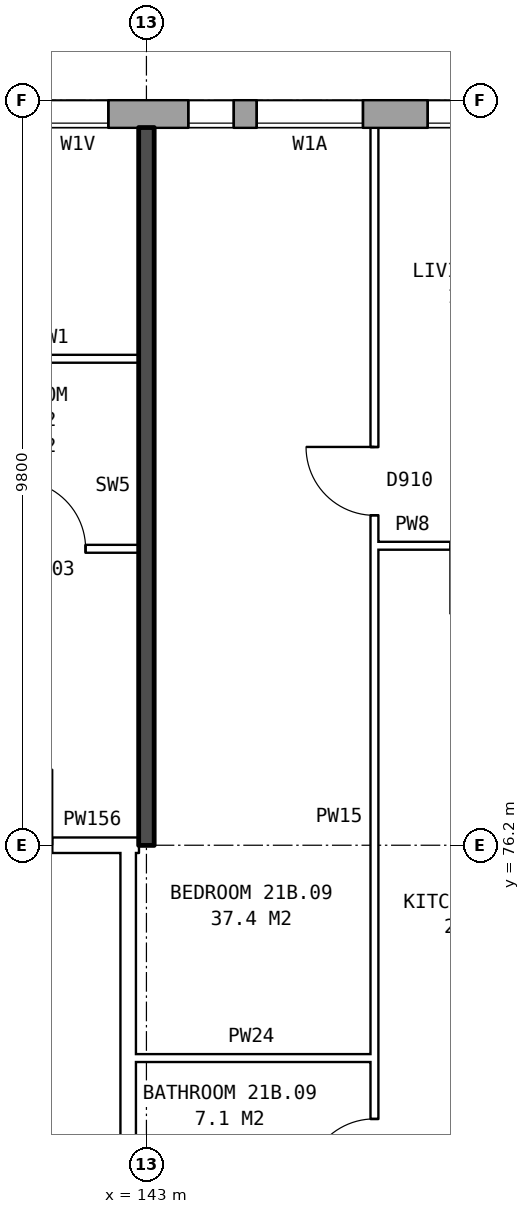
"""IFC4 building model, lengths in metres.
Left out: names, types, materials, properties, quantities, classifications, styles, units other than length and angle.
Written with IfcOpenShell. Run it as: python <this file> out.ifc"""

import sys

from ifc_helpers import new_model, si_unit, direction, frame, frame_2d, origin, place, context, subcontext, project, spatial, rectangle, extrude, element, fill, save


model = new_model("IFC4")
c1 = context("Model", 3, precision=1e-05, world=origin(), true_north=direction((0.0, 1.0)))
c2 = subcontext(c1, "Body", "Model", "MODEL_VIEW")
j1 = project(units=[si_unit("LENGTHUNIT", "METRE"), si_unit("PLANEANGLEUNIT", "RADIAN")], contexts=[c1])
p1 = place(None, origin())
s1 = spatial("IfcSite", under=j1, at=p1, CompositionType="ELEMENT")
p2 = place(p1, origin())
s2 = spatial("IfcBuilding", under=s1, at=p2, CompositionType="ELEMENT")
p3 = place(p2, frame((0.0, 0.0, 77.8)))
s3 = spatial("IfcBuildingStorey", under=s2, at=p3, CompositionType="ELEMENT", Elevation=77.8)
p4 = place(p3, frame((172.175, 85.82, 0.0), z_axis=(0.0, 0.0, 1.0), x_axis=(-1.0, 0.0, 0.0)))
e1 = element("IfcWall", 1, at=p4, inside=s3, PredefinedType="STANDARD", context=c2, shape_type="SweptSolid", body=[
    extrude(rectangle(XDim=38.101, YDim=0.36, at=frame_2d((19.05, 0.0))), origin(), (0.0, 0.0, 1.0), 2.85),
])
p5 = place(p4, frame((2.875, 0.0, 0.8)))
e2 = element("IfcOpeningElement", 2, at=p5, cuts=e1, PredefinedType="OPENING", context=c2, shape_type="SweptSolid", body=[
    extrude(rectangle(XDim=1.6, YDim=1.8, at=frame_2d((0.8, 0.9))), frame((0.0, 0.19, 0.0), z_axis=(0.0, -1.0, 0.0), x_axis=(1.0, 0.0, 0.0)), (0.0, 0.0, 1.0), 0.38),
])
p6 = place(p4, frame((5.875, 0.0, 0.8)))
e3 = element("IfcOpeningElement", 3, at=p6, cuts=e1, PredefinedType="OPENING", context=c2, shape_type="SweptSolid", body=[
    extrude(rectangle(XDim=1.6, YDim=1.8, at=frame_2d((0.8, 0.9))), frame((0.0, 0.19, 0.0), z_axis=(0.0, -1.0, 0.0), x_axis=(1.0, 0.0, 0.0)), (0.0, 0.0, 1.0), 0.38),
])
p7 = place(p4, frame((7.775, 0.0, 1.7)))
e4 = element("IfcOpeningElement", 4, at=p7, cuts=e1, PredefinedType="OPENING", context=c2, shape_type="SweptSolid", body=[
    extrude(rectangle(XDim=0.6, YDim=0.9, at=frame_2d((0.3, 0.45))), frame((0.0, 0.19, 0.0), z_axis=(0.0, -1.0, 0.0), x_axis=(1.0, 0.0, 0.0)), (0.0, 0.0, 1.0), 0.38),
])
p8 = place(p4, frame((11.875, 0.0, 0.8)))
e5 = element("IfcOpeningElement", 5, at=p8, cuts=e1, PredefinedType="OPENING", context=c2, shape_type="SweptSolid", body=[
    extrude(rectangle(XDim=1.6, YDim=1.8, at=frame_2d((0.8, 0.9))), frame((0.0, 0.19, 0.0), z_axis=(0.0, -1.0, 0.0), x_axis=(1.0, 0.0, 0.0)), (0.0, 0.0, 1.0), 0.38),
])
p9 = place(p4, frame((14.875, 0.0, 0.8)))
e6 = element("IfcOpeningElement", 6, at=p9, cuts=e1, PredefinedType="OPENING", context=c2, shape_type="SweptSolid", body=[
    extrude(rectangle(XDim=1.6, YDim=1.8, at=frame_2d((0.8, 0.9))), frame((0.0, 0.19, 0.0), z_axis=(0.0, -1.0, 0.0), x_axis=(1.0, 0.0, 0.0)), (0.0, 0.0, 1.0), 0.38),
])
p10 = place(p4, frame((17.875, 0.0, 0.8)))
e7 = element("IfcOpeningElement", 7, at=p10, cuts=e1, PredefinedType="OPENING", context=c2, shape_type="SweptSolid", body=[
    extrude(rectangle(XDim=1.6, YDim=1.8, at=frame_2d((0.8, 0.9))), frame((0.0, 0.19, 0.0), z_axis=(0.0, -1.0, 0.0), x_axis=(1.0, 0.0, 0.0)), (0.0, 0.0, 1.0), 0.38),
])
p11 = place(p4, frame((20.875, 0.0, 0.8)))
e8 = element("IfcOpeningElement", 8, at=p11, cuts=e1, PredefinedType="OPENING", context=c2, shape_type="SweptSolid", body=[
    extrude(rectangle(XDim=1.6, YDim=1.8, at=frame_2d((0.8, 0.9))), frame((0.0, 0.19, 0.0), z_axis=(0.0, -1.0, 0.0), x_axis=(1.0, 0.0, 0.0)), (0.0, 0.0, 1.0), 0.38),
])
p12 = place(p4, frame((23.875, 0.0, 0.8)))
e9 = element("IfcOpeningElement", 9, at=p12, cuts=e1, PredefinedType="OPENING", context=c2, shape_type="SweptSolid", body=[
    extrude(rectangle(XDim=1.6, YDim=1.8, at=frame_2d((0.8, 0.9))), frame((0.0, 0.19, 0.0), z_axis=(0.0, -1.0, 0.0), x_axis=(1.0, 0.0, 0.0)), (0.0, 0.0, 1.0), 0.38),
])
p13 = place(p4, frame((26.325, 0.0, 0.65)))
e10 = element("IfcOpeningElement", 10, at=p13, cuts=e1, PredefinedType="OPENING", context=c2, shape_type="SweptSolid", body=[
    extrude(rectangle(XDim=1.4, YDim=1.8, at=frame_2d((0.7, 0.9))), frame((0.0, 0.19, 0.0), z_axis=(0.0, -1.0, 0.0), x_axis=(1.0, 0.0, 0.0)), (0.0, 0.0, 1.0), 0.38),
])
p14 = place(p4, frame((29.675, 0.0, 1.7)))
e11 = element("IfcOpeningElement", 11, at=p14, cuts=e1, PredefinedType="OPENING", context=c2, shape_type="SweptSolid", body=[
    extrude(rectangle(XDim=0.8, YDim=0.9, at=frame_2d((0.4, 0.45))), frame((0.0, 0.19, 0.0), z_axis=(0.0, -1.0, 0.0), x_axis=(1.0, 0.0, 0.0)), (0.0, 0.0, 1.0), 0.38),
])
p15 = place(p4, frame((32.875, 0.0, 0.8)))
e12 = element("IfcOpeningElement", 12, at=p15, cuts=e1, PredefinedType="OPENING", context=c2, shape_type="SweptSolid", body=[
    extrude(rectangle(XDim=1.6, YDim=1.8, at=frame_2d((0.8, 0.9))), frame((0.0, 0.19, 0.0), z_axis=(0.0, -1.0, 0.0), x_axis=(1.0, 0.0, 0.0)), (0.0, 0.0, 1.0), 0.38),
])
p16 = place(p4, frame((35.875, 0.0, 0.8)))
e13 = element("IfcOpeningElement", 13, at=p16, cuts=e1, PredefinedType="OPENING", context=c2, shape_type="SweptSolid", body=[
    extrude(rectangle(XDim=1.6, YDim=1.8, at=frame_2d((0.8, 0.9))), frame((0.0, 0.19, 0.0), z_axis=(0.0, -1.0, 0.0), x_axis=(1.0, 0.0, 0.0)), (0.0, 0.0, 1.0), 0.38),
])
p17 = place(p4, frame((9.575, 0.0, 0.8)))
e14 = element("IfcOpeningElement", 14, at=p17, cuts=e1, PredefinedType="OPENING", context=c2, shape_type="SweptSolid", body=[
    extrude(rectangle(XDim=1.4, YDim=0.9, at=frame_2d((0.7, 0.45))), frame((0.0, 0.19, 0.0), z_axis=(0.0, -1.0, 0.0), x_axis=(1.0, 0.0, 0.0)), (0.0, 0.0, 1.0), 0.38),
])
p18 = place(p4, frame((28.025, 0.0, 0.65)))
e15 = element("IfcOpeningElement", 15, at=p18, cuts=e1, PredefinedType="OPENING", context=c2, shape_type="SweptSolid", body=[
    extrude(rectangle(XDim=0.6, YDim=0.9, at=frame_2d((0.3, 0.45))), frame((0.0, 0.19, 0.0), z_axis=(0.0, -1.0, 0.0), x_axis=(1.0, 0.0, 0.0)), (0.0, 0.0, 1.0), 0.38),
])
p19 = place(p4, frame((30.775, 0.0, 0.8)))
e16 = element("IfcOpeningElement", 16, at=p19, cuts=e1, PredefinedType="OPENING", context=c2, shape_type="SweptSolid", body=[
    extrude(rectangle(XDim=1.6, YDim=1.8, at=frame_2d((0.8, 0.9))), frame((0.0, 0.19, 0.0), z_axis=(0.0, -1.0, 0.0), x_axis=(1.0, 0.0, 0.0)), (0.0, 0.0, 1.0), 0.38),
])
p20 = place(p3, frame((142.76, 63.9, 0.0), z_axis=(0.0, 0.0, 1.0), x_axis=(0.0, 1.0, 0.0)))
e17 = element("IfcWall", 17, at=p20, inside=s3, PredefinedType="PARTITIONING", context=c2, shape_type="SweptSolid", body=[
    extrude(rectangle(XDim=12.2, YDim=0.2, at=frame_2d((6.1, 0.0))), origin(), (0.0, 0.0, 1.0), 2.85),
])
p21 = place(p20, frame((5.1, 0.0, 0.0)))
e18 = element("IfcOpeningElement", 18, at=p21, cuts=e17, PredefinedType="OPENING", context=c2, shape_type="SweptSolid", body=[
    extrude(rectangle(XDim=2.0, YDim=2.1, at=frame_2d((1.0, 1.05))), frame((0.0, 0.11, 0.0), z_axis=(0.0, -1.0, 0.0), x_axis=(1.0, 0.0, 0.0)), (0.0, 0.0, 1.0), 0.22),
])
p22 = place(p3, frame((142.76, 73.4, 0.0), z_axis=(0.0, 0.0, 1.0), x_axis=(1.0, 0.0, 0.0)))
e19 = element("IfcWall", 19, at=p22, inside=s3, PredefinedType="PARTITIONING", context=c2, shape_type="SweptSolid", body=[
    extrude(rectangle(XDim=3.24, YDim=0.1, at=frame_2d((1.62, 0.0))), origin(), (0.0, 0.0, 1.0), 2.85),
])
p23 = place(p3, frame((139.76, 76.2, 0.0), z_axis=(0.0, 0.0, 1.0), x_axis=(1.0, 0.0, 0.0)))
e20 = element("IfcWall", 20, at=p23, inside=s3, PredefinedType="PARTITIONING", context=c2, shape_type="SweptSolid", body=[
    extrude(rectangle(XDim=3.0, YDim=0.2, at=frame_2d((1.5, 0.0))), origin(), (0.0, 0.0, 1.0), 2.85),
])
p24 = place(p23, frame((1.0, 0.0, 0.0)))
e21 = element("IfcOpeningElement", 21, at=p24, cuts=e20, PredefinedType="OPENING", context=c2, shape_type="SweptSolid", body=[
    extrude(rectangle(XDim=1.0, YDim=2.1, at=frame_2d((0.5, 1.05))), frame((0.0, 0.11, 0.0), z_axis=(0.0, -1.0, 0.0), x_axis=(1.0, 0.0, 0.0)), (0.0, 0.0, 1.0), 0.22),
])
p25 = place(p3, frame((142.76, 76.2, 0.0), z_axis=(0.0, 0.0, 1.0), x_axis=(1.0, 0.0, 0.0)))
e22 = element("IfcWall", 22, at=p25, inside=s3, PredefinedType="PARTITIONING", context=c2, shape_type="SweptSolid", body=[
    extrude(rectangle(XDim=0.14, YDim=0.2, at=frame_2d((0.07, 0.0))), origin(), (0.0, 0.0, 1.0), 2.85),
])
p26 = place(p3, frame((137.1, 80.1, 0.0), z_axis=(0.0, 0.0, 1.0), x_axis=(1.0, 0.0, 0.0)))
e23 = element("IfcWall", 23, at=p26, inside=s3, PredefinedType="PARTITIONING", context=c2, shape_type="SweptSolid", body=[
    extrude(rectangle(XDim=5.8, YDim=0.1, at=frame_2d((2.9, 0.0))), origin(), (0.0, 0.0, 1.0), 2.85),
])
p27 = place(p26, frame((1.3, 0.0, 0.0)))
e24 = element("IfcOpeningElement", 24, at=p27, cuts=e23, PredefinedType="OPENING", context=c2, shape_type="SweptSolid", body=[
    extrude(rectangle(XDim=0.9, YDim=2.1, at=frame_2d((0.45, 1.05))), frame((0.0, 0.06, 0.0), z_axis=(0.0, -1.0, 0.0), x_axis=(1.0, 0.0, 0.0)), (0.0, 0.0, 1.0), 0.12),
])
p28 = place(p26, frame((4.2, 0.0, 0.0)))
e25 = element("IfcOpeningElement", 25, at=p28, cuts=e23, PredefinedType="OPENING", context=c2, shape_type="SweptSolid", body=[
    extrude(rectangle(XDim=0.9, YDim=2.1, at=frame_2d((0.45, 1.05))), frame((0.0, 0.06, 0.0), z_axis=(0.0, -1.0, 0.0), x_axis=(1.0, 0.0, 0.0)), (0.0, 0.0, 1.0), 0.12),
])
p29 = place(p3, frame((146.0, 80.14, 0.0), z_axis=(0.0, 0.0, 1.0), x_axis=(1.0, 0.0, 0.0)))
e26 = element("IfcWall", 26, at=p29, inside=s3, PredefinedType="PARTITIONING", context=c2, shape_type="SweptSolid", body=[
    extrude(rectangle(XDim=2.9, YDim=0.1, at=frame_2d((1.45, 0.0))), origin(), (0.0, 0.0, 1.0), 2.85),
])
p30 = place(p29, frame((1.0, 0.0, 0.0)))
e27 = element("IfcOpeningElement", 27, at=p30, cuts=e26, PredefinedType="OPENING", context=c2, shape_type="SweptSolid", body=[
    extrude(rectangle(XDim=0.9, YDim=2.1, at=frame_2d((0.45, 1.05))), frame((0.0, 0.06, 0.0), z_axis=(0.0, -1.0, 0.0), x_axis=(1.0, 0.0, 0.0)), (0.0, 0.0, 1.0), 0.12),
])
p31 = place(p3, frame((140.6, 82.6, 0.0), z_axis=(0.0, 0.0, 1.0), x_axis=(1.0, 0.0, 0.0)))
e28 = element("IfcWall", 28, at=p31, inside=s3, PredefinedType="PARTITIONING", context=c2, shape_type="SweptSolid", body=[
    extrude(rectangle(XDim=2.3, YDim=0.1, at=frame_2d((1.15, 0.0))), origin(), (0.0, 0.0, 1.0), 2.85),
])
p32 = place(p3, frame((143.0, 76.2, 0.0), z_axis=(0.0, 0.0, 1.0), x_axis=(0.0, 1.0, 0.0)))
e29 = element("IfcWall", 29, at=p32, inside=s3, PredefinedType="SOLIDWALL", context=c2, shape_type="SweptSolid", body=[
    extrude(rectangle(XDim=9.44, YDim=0.2, at=frame_2d((4.72, 0.0))), origin(), (0.0, 0.0, 1.0), 2.85),
])
p33 = place(p3, frame((146.0, 71.3, 0.0), z_axis=(0.0, 0.0, 1.0), x_axis=(0.0, 1.0, 0.0)))
e30 = element("IfcWall", 30, at=p33, inside=s3, PredefinedType="PARTITIONING", context=c2, shape_type="SweptSolid", body=[
    extrude(rectangle(XDim=14.34, YDim=0.1, at=frame_2d((7.17, 0.0))), origin(), (0.0, 0.0, 1.0), 2.85),
])
p34 = place(p33, frame((9.24, 0.0, 0.0)))
e31 = element("IfcOpeningElement", 31, at=p34, cuts=e30, PredefinedType="OPENING", context=c2, shape_type="SweptSolid", body=[
    extrude(rectangle(XDim=0.9, YDim=2.1, at=frame_2d((0.45, 1.05))), frame((0.0, 0.06, 0.0), z_axis=(0.0, -1.0, 0.0), x_axis=(1.0, 0.0, 0.0)), (0.0, 0.0, 1.0), 0.12),
])
p35 = place(p33, frame((0.4, 0.0, 0.0)))
e32 = element("IfcOpeningElement", 32, at=p35, cuts=e30, PredefinedType="OPENING", context=c2, shape_type="SweptSolid", body=[
    extrude(rectangle(XDim=0.9, YDim=2.1, at=frame_2d((0.45, 1.05))), frame((0.0, 0.06, 0.0), z_axis=(0.0, -1.0, 0.0), x_axis=(1.0, 0.0, 0.0)), (0.0, 0.0, 1.0), 0.12),
])
p36 = place(p12, origin())
e33 = element("IfcWindow", 33, at=p36, inside=s3, PartitioningType="SINGLE_PANEL", PredefinedType="WINDOW", context=c2, shape_type="SweptSolid", body=[
    extrude(rectangle(XDim=1.6, YDim=1.8, at=frame_2d((0.8, 0.9))), frame((0.0, 0.15, 0.0), z_axis=(0.0, -1.0, 0.0), x_axis=(1.0, 0.0, 0.0)), (0.0, 0.0, 1.0), 0.06),
])
fill(e9, e33)
p37 = place(p13, origin())
e34 = element("IfcWindow", 34, at=p37, inside=s3, PartitioningType="SINGLE_PANEL", PredefinedType="WINDOW", context=c2, shape_type="SweptSolid", body=[
    extrude(rectangle(XDim=1.4, YDim=1.8, at=frame_2d((0.7, 0.9))), frame((0.0, 0.15, 0.0), z_axis=(0.0, -1.0, 0.0), x_axis=(1.0, 0.0, 0.0)), (0.0, 0.0, 1.0), 0.06),
])
fill(e10, e34)
p38 = place(p14, origin())
e35 = element("IfcWindow", 35, at=p38, inside=s3, PartitioningType="SINGLE_PANEL", PredefinedType="WINDOW", context=c2, shape_type="SweptSolid", body=[
    extrude(rectangle(XDim=0.8, YDim=0.9, at=frame_2d((0.4, 0.45))), frame((0.0, 0.15, 0.0), z_axis=(0.0, -1.0, 0.0), x_axis=(1.0, 0.0, 0.0)), (0.0, 0.0, 1.0), 0.06),
])
fill(e11, e35)
p39 = place(p28, origin())
e36 = element("IfcDoor", 36, at=p39, inside=s3, OperationType="SINGLE_SWING_LEFT", PredefinedType="DOOR", context=c2, shape_type="SweptSolid", body=[
    extrude(rectangle(XDim=0.9, YDim=2.1, at=frame_2d((0.45, 1.05))), frame((0.0, 0.025, 0.0), z_axis=(0.0, -1.0, 0.0), x_axis=(1.0, 0.0, 0.0)), (0.0, 0.0, 1.0), 0.05),
])
fill(e25, e36)
p40 = place(p34, origin())
e37 = element("IfcDoor", 37, at=p40, inside=s3, OperationType="SINGLE_SWING_RIGHT", PredefinedType="DOOR", context=c2, shape_type="SweptSolid", body=[
    extrude(rectangle(XDim=0.9, YDim=2.1, at=frame_2d((0.45, 1.05))), frame((0.0, 0.025, 0.0), z_axis=(0.0, -1.0, 0.0), x_axis=(1.0, 0.0, 0.0)), (0.0, 0.0, 1.0), 0.05),
])
fill(e31, e37)
p41 = place(p35, origin())
e38 = element("IfcDoor", 38, at=p41, inside=s3, OperationType="SINGLE_SWING_LEFT", PredefinedType="DOOR", context=c2, shape_type="SweptSolid", body=[
    extrude(rectangle(XDim=0.9, YDim=2.1, at=frame_2d((0.45, 1.05))), frame((0.0, 0.025, 0.0), z_axis=(0.0, -1.0, 0.0), x_axis=(1.0, 0.0, 0.0)), (0.0, 0.0, 1.0), 0.05),
])
fill(e32, e38)
p42 = place(p18, origin())
e39 = element("IfcWindow", 39, at=p42, inside=s3, PartitioningType="SINGLE_PANEL", PredefinedType="WINDOW", context=c2, shape_type="SweptSolid", body=[
    extrude(rectangle(XDim=0.6, YDim=0.9, at=frame_2d((0.3, 0.45))), frame((0.0, 0.15, 0.0), z_axis=(0.0, -1.0, 0.0), x_axis=(1.0, 0.0, 0.0)), (0.0, 0.0, 1.0), 0.06),
])
fill(e15, e39)
save(model, sys.argv[1])
